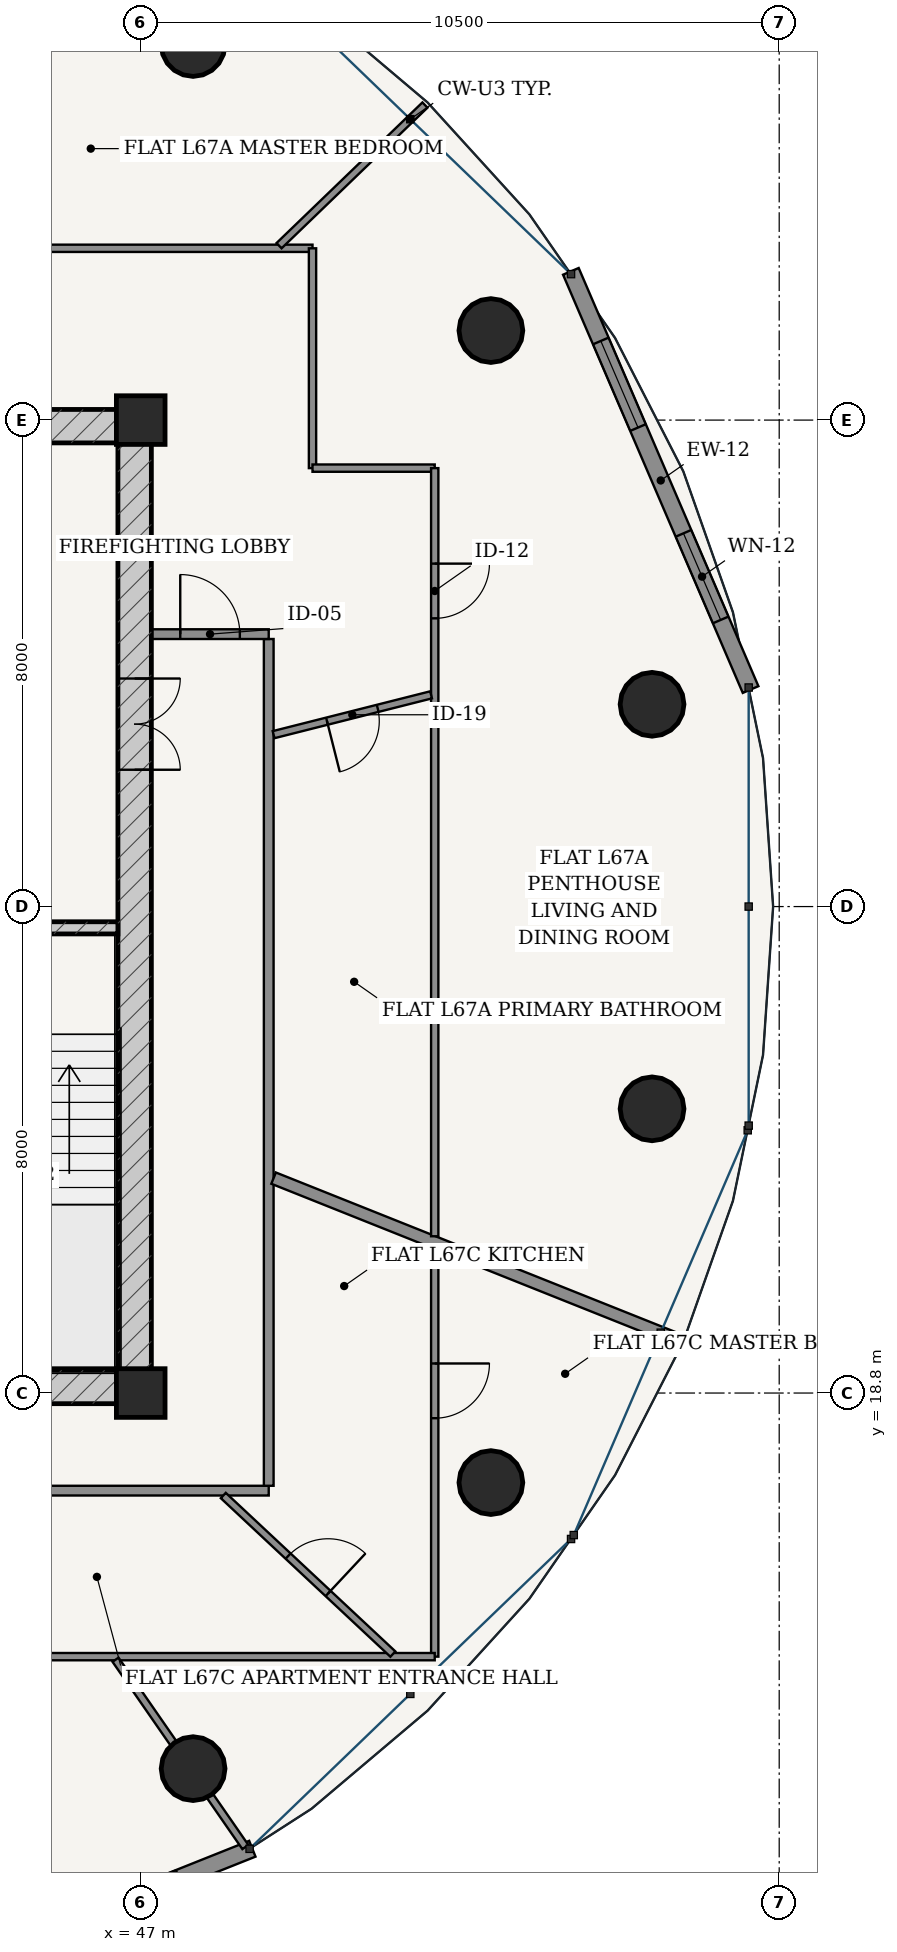
"""IFC4 building model, lengths in metres.
Left out: names, types, materials, properties, quantities, classifications, styles, units other than length and angle.
Written with IfcOpenShell. Run it as: python <this file> out.ifc"""

import sys

from ifc_helpers import new_model, si_unit, direction, frame, frame_2d, origin, origin_2d, place, context, subcontext, project, spatial, rectangle, hollow_circle, extrude, source, transform, mapped, element, fill, save


model = new_model("IFC4")
c1 = context("Model", 3, precision=1e-05, world=origin(), true_north=direction((-0.2419218956, 0.970295726276)))
c2 = subcontext(c1, "Body", "Model", "MODEL_VIEW")
j1 = project(units=[si_unit("LENGTHUNIT", "METRE"), si_unit("PLANEANGLEUNIT", "RADIAN")], contexts=[c1])
p1 = place(None, origin())
s1 = spatial("IfcSite", under=j1, at=p1, CompositionType="ELEMENT")
p2 = place(p1, origin())
s2 = spatial("IfcBuilding", under=s1, at=p2, CompositionType="ELEMENT")
p3 = place(p2, frame((0.0, 0.0, 255.7)))
s3 = spatial("IfcBuildingStorey", under=s2, at=p3, CompositionType="ELEMENT", Elevation=255.7)
for number, where, z_axis, x_axis in (
    (1, (47.0, 18.8, 0.0), (0.0, 0.0, 1.0), (1.0, 0.0, 0.0)),
    (2, (47.0, 34.8, 0.0), (0.0, 0.0, 1.0), (1.0, 0.0, 0.0)),
):
    element("IfcColumn", number, at=place(p3, frame(where, z_axis=z_axis, x_axis=x_axis)), inside=s3, PredefinedType="COLUMN", context=c2, shape_type="SweptSolid", body=[
        extrude(rectangle(XDim=0.8, YDim=0.8, at=origin_2d()), origin(), (0.0, 0.0, 1.0), 3.75),
    ])
p4 = place(p3, frame((28.825, 18.9, 0.0), z_axis=(0.0, 0.0, 1.0), x_axis=(1.0, 0.0, 0.0)))
e3 = element("IfcWall", 3, at=p4, inside=s3, PredefinedType="SHEAR", context=c2, shape_type="SweptSolid", body=[
    extrude(rectangle(XDim=18.35, YDim=0.55, at=frame_2d((9.175, 0.0))), origin(), (0.0, 0.0, 1.0), 3.49),
])
p5 = place(p4, frame((7.41, 0.0, 0.0)))
e4 = element("IfcOpeningElement", 4, at=p5, cuts=e3, PredefinedType="OPENING", context=c2, shape_type="SweptSolid", body=[
    extrude(rectangle(XDim=0.85, YDim=2.1, at=frame_2d((0.425, 1.05))), frame((0.0, 0.285, 0.0), z_axis=(0.0, -1.0, 0.0), x_axis=(1.0, 0.0, 0.0)), (0.0, 0.0, 1.0), 0.57),
])
p6 = place(p4, frame((10.49, 0.0, 0.0)))
e5 = element("IfcOpeningElement", 5, at=p6, cuts=e3, PredefinedType="OPENING", context=c2, shape_type="SweptSolid", body=[
    extrude(rectangle(XDim=0.85, YDim=2.1, at=frame_2d((0.425, 1.05))), frame((0.0, 0.285, 0.0), z_axis=(0.0, -1.0, 0.0), x_axis=(1.0, 0.0, 0.0)), (0.0, 0.0, 1.0), 0.57),
])
p7 = place(p3, frame((28.825, 34.7, 0.0), z_axis=(0.0, 0.0, 1.0), x_axis=(1.0, 0.0, 0.0)))
e6 = element("IfcWall", 6, at=p7, inside=s3, PredefinedType="SHEAR", context=c2, shape_type="SweptSolid", body=[
    extrude(rectangle(XDim=18.35, YDim=0.55, at=frame_2d((9.175, 0.0))), origin(), (0.0, 0.0, 1.0), 3.49),
])
p8 = place(p3, frame((46.9, 19.175, 0.0), z_axis=(0.0, 0.0, 1.0), x_axis=(0.0, 1.0, 0.0)))
e7 = element("IfcWall", 7, at=p8, inside=s3, PredefinedType="SHEAR", context=c2, shape_type="SweptSolid", body=[
    extrude(rectangle(XDim=15.25, YDim=0.55, at=frame_2d((7.625, 0.0))), origin(), (0.0, 0.0, 1.0), 3.49),
])
p9 = place(p8, frame((9.875, 0.0, 0.0)))
e8 = element("IfcOpeningElement", 8, at=p9, cuts=e7, PredefinedType="OPENING", context=c2, shape_type="SweptSolid", body=[
    extrude(rectangle(XDim=1.5, YDim=2.2, at=frame_2d((0.75, 1.1))), frame((0.0, 0.285, 0.0), z_axis=(0.0, -1.0, 0.0), x_axis=(1.0, 0.0, 0.0)), (0.0, 0.0, 1.0), 0.57),
])
p10 = place(p3, frame((43.305, 26.45, 0.0), z_axis=(0.0, 0.0, 1.0), x_axis=(1.0, 0.0, 0.0)))
e9 = element("IfcWall", 9, at=p10, inside=s3, PredefinedType="SOLIDWALL", context=c2, shape_type="SweptSolid", body=[
    extrude(rectangle(XDim=3.32, YDim=0.2, at=frame_2d((1.66, 0.0))), origin(), (0.0, 0.0, 1.0), 3.49),
])
p11 = place(p10, frame((1.185, 0.0, 0.0)))
e10 = element("IfcOpeningElement", 10, at=p11, cuts=e9, PredefinedType="OPENING", context=c2, shape_type="SweptSolid", body=[
    extrude(rectangle(XDim=0.95, YDim=2.15, at=frame_2d((0.475, 1.075))), frame((0.0, 0.11, 0.0), z_axis=(0.0, -1.0, 0.0), x_axis=(1.0, 0.0, 0.0)), (0.0, 0.0, 1.0), 0.22),
])
for number, where, z_axis, x_axis in (
    (11, (55.409, 30.126, 0.0), (0.0, 0.0, 1.0), (1.0, 0.0, 0.0)),
    (12, (52.759, 36.272, 0.0), (0.0, 0.0, 1.0), (1.0, 0.0, 0.0)),
    (13, (47.861, 40.977, 0.0), (0.0, 0.0, 1.0), (1.0, 0.0, 0.0)),
    (14, (47.861, 12.624, 0.0), (0.0, 0.0, 1.0), (1.0, 0.0, 0.0)),
    (15, (52.759, 17.328, 0.0), (0.0, 0.0, 1.0), (1.0, 0.0, 0.0)),
    (16, (55.409, 23.474, 0.0), (0.0, 0.0, 1.0), (1.0, 0.0, 0.0)),
):
    element("IfcColumn", number, at=place(p3, frame(where, z_axis=z_axis, x_axis=x_axis)), inside=s3, PredefinedType="COLUMN", context=c2, shape_type="SweptSolid", body=[
        extrude(hollow_circle(Radius=0.525, WallThickness=0.035, at=origin_2d()), origin(), (0.0, 0.0, 1.0), 3.75),
    ])
p12 = place(p3, frame((57.029, 30.369, 0.0), z_axis=(0.0, 0.0, 1.0), x_axis=(-0.394816612978, 0.918759948037, 0.0)))
e17 = element("IfcWall", 17, at=p12, inside=s3, PredefinedType="SOLIDWALL", context=c2, shape_type="SweptSolid", body=[
    extrude(rectangle(XDim=7.485, YDim=0.28, at=frame_2d((3.743, 0.0))), origin(), (0.0, 0.0, 1.0), 3.49),
])
p13 = place(p12, frame((1.246, 0.0, 0.85)))
e18 = element("IfcOpeningElement", 18, at=p13, cuts=e17, PredefinedType="OPENING", context=c2, shape_type="SweptSolid", body=[
    extrude(rectangle(XDim=1.55, YDim=1.95, at=frame_2d((0.775, 0.975))), frame((0.0, 0.15, 0.0), z_axis=(0.0, -1.0, 0.0), x_axis=(1.0, 0.0, 0.0)), (0.0, 0.0, 1.0), 0.3),
])
p14 = place(p12, frame((4.689, 0.0, 0.85)))
e19 = element("IfcOpeningElement", 19, at=p14, cuts=e17, PredefinedType="OPENING", context=c2, shape_type="SweptSolid", body=[
    extrude(rectangle(XDim=1.55, YDim=1.95, at=frame_2d((0.775, 0.975))), frame((0.0, 0.15, 0.0), z_axis=(0.0, -1.0, 0.0), x_axis=(1.0, 0.0, 0.0)), (0.0, 0.0, 1.0), 0.3),
])
p15 = place(p3, frame((41.705, 8.459, 0.0), z_axis=(0.0, 0.0, 1.0), x_axis=(0.92871332341, 0.370798547626, 0.0)))
e20 = element("IfcWall", 20, at=p15, inside=s3, PredefinedType="SOLIDWALL", context=c2, shape_type="SweptSolid", body=[
    extrude(rectangle(XDim=7.678, YDim=0.28, at=frame_2d((3.839, 0.0))), origin(), (0.0, 0.0, 1.0), 3.49),
])
p16 = place(p15, frame((1.298, 0.0, 0.85)))
e21 = element("IfcOpeningElement", 21, at=p16, cuts=e20, PredefinedType="OPENING", context=c2, shape_type="SweptSolid", body=[
    extrude(rectangle(XDim=1.55, YDim=1.95, at=frame_2d((0.775, 0.975))), frame((0.0, 0.15, 0.0), z_axis=(0.0, -1.0, 0.0), x_axis=(1.0, 0.0, 0.0)), (0.0, 0.0, 1.0), 0.3),
])
p17 = place(p15, frame((4.83, 0.0, 0.85)))
e22 = element("IfcOpeningElement", 22, at=p17, cuts=e20, PredefinedType="OPENING", context=c2, shape_type="SweptSolid", body=[
    extrude(rectangle(XDim=1.55, YDim=1.95, at=frame_2d((0.775, 0.975))), frame((0.0, 0.15, 0.0), z_axis=(0.0, -1.0, 0.0), x_axis=(1.0, 0.0, 0.0)), (0.0, 0.0, 1.0), 0.3),
])
p18 = place(p3, frame((26.895, 17.195, 0.0), z_axis=(0.0, 0.0, 1.0), x_axis=(1.0, 0.0, 0.0)))
e23 = element("IfcWall", 23, at=p18, inside=s3, PredefinedType="PARTITIONING", context=c2, shape_type="SweptSolid", body=[
    extrude(rectangle(XDim=22.21, YDim=0.16, at=frame_2d((11.105, 0.0))), origin(), (0.0, 0.0, 1.0), 3.015),
])
p19 = place(p18, frame((2.861, 0.0, 0.0)))
e24 = element("IfcOpeningElement", 24, at=p19, cuts=e23, PredefinedType="OPENING", context=c2, shape_type="SweptSolid", body=[
    extrude(rectangle(XDim=0.98, YDim=2.2, at=frame_2d((0.49, 1.1))), frame((0.0, 0.09, 0.0), z_axis=(0.0, -1.0, 0.0), x_axis=(1.0, 0.0, 0.0)), (0.0, 0.0, 1.0), 0.18),
])
p20 = place(p18, frame((16.97, 0.0, 0.0)))
e25 = element("IfcOpeningElement", 25, at=p20, cuts=e23, PredefinedType="OPENING", context=c2, shape_type="SweptSolid", body=[
    extrude(rectangle(XDim=0.98, YDim=2.2, at=frame_2d((0.49, 1.1))), frame((0.0, 0.09, 0.0), z_axis=(0.0, -1.0, 0.0), x_axis=(1.0, 0.0, 0.0)), (0.0, 0.0, 1.0), 0.18),
])
p21 = place(p3, frame((49.105, 17.275, 0.0), z_axis=(0.0, 0.0, 1.0), x_axis=(0.0, 1.0, 0.0)))
e26 = element("IfcWall", 26, at=p21, inside=s3, PredefinedType="PARTITIONING", context=c2, shape_type="SweptSolid", body=[
    extrude(rectangle(XDim=13.925, YDim=0.16, at=frame_2d((6.962, 0.0))), origin(), (0.0, 0.0, 1.0), 3.015),
])
p22 = place(p3, frame((47.175, 31.28, 0.0), z_axis=(0.0, 0.0, 1.0), x_axis=(1.0, 0.0, 0.0)))
e27 = element("IfcWall", 27, at=p22, inside=s3, PredefinedType="PARTITIONING", context=c2, shape_type="SweptSolid", body=[
    extrude(rectangle(XDim=1.93, YDim=0.16, at=frame_2d((0.965, 0.0))), origin(), (0.0, 0.0, 1.0), 3.49),
])
p23 = place(p22, frame((0.475, 0.0, 0.0)))
e28 = element("IfcOpeningElement", 28, at=p23, cuts=e27, PredefinedType="OPENING", context=c2, shape_type="SweptSolid", body=[
    extrude(rectangle(XDim=0.98, YDim=2.2, at=frame_2d((0.49, 1.1))), frame((0.0, 0.09, 0.0), z_axis=(0.0, -1.0, 0.0), x_axis=(1.0, 0.0, 0.0)), (0.0, 0.0, 1.0), 0.18),
])
p24 = place(p3, frame((49.185, 22.334, 0.0), z_axis=(0.0, 0.0, 1.0), x_axis=(0.928710518269, -0.370805573389, 0.0)))
e29 = element("IfcWall", 29, at=p24, inside=s3, PredefinedType="PARTITIONING", context=c2, shape_type="SweptSolid", body=[
    extrude(rectangle(XDim=7.195, YDim=0.2, at=frame_2d((3.598, 0.0))), origin(), (0.0, 0.0, 1.0), 3.121),
])
p25 = place(p3, frame((26.175, 37.625, 0.0), z_axis=(0.0, 0.0, 1.0), x_axis=(1.0, 0.0, 0.0)))
e30 = element("IfcWall", 30, at=p25, inside=s3, PredefinedType="PARTITIONING", context=c2, shape_type="SweptSolid", body=[
    extrude(rectangle(XDim=23.65, YDim=0.12, at=frame_2d((11.825, 0.0))), origin(), (0.0, 0.0, 1.0), 3.015),
])
p26 = place(p25, frame((12.791, 0.0, 0.0)))
e31 = element("IfcOpeningElement", 31, at=p26, cuts=e30, PredefinedType="OPENING", context=c2, shape_type="SweptSolid", body=[
    extrude(rectangle(XDim=0.9, YDim=2.15, at=frame_2d((0.45, 1.075))), frame((0.0, 0.07, 0.0), z_axis=(0.0, -1.0, 0.0), x_axis=(1.0, 0.0, 0.0)), (0.0, 0.0, 1.0), 0.14),
])
p27 = place(p25, frame((6.48, 0.0, 0.0)))
e32 = element("IfcOpeningElement", 32, at=p27, cuts=e30, PredefinedType="OPENING", context=c2, shape_type="SweptSolid", body=[
    extrude(rectangle(XDim=0.9, YDim=2.15, at=frame_2d((0.45, 1.075))), frame((0.0, 0.07, 0.0), z_axis=(0.0, -1.0, 0.0), x_axis=(1.0, 0.0, 0.0)), (0.0, 0.0, 1.0), 0.14),
])
p28 = place(p25, frame((1.831, 0.0, 0.0)))
e33 = element("IfcOpeningElement", 33, at=p28, cuts=e30, PredefinedType="OPENING", context=c2, shape_type="SweptSolid", body=[
    extrude(rectangle(XDim=0.9, YDim=2.15, at=frame_2d((0.45, 1.075))), frame((0.0, 0.07, 0.0), z_axis=(0.0, -1.0, 0.0), x_axis=(1.0, 0.0, 0.0)), (0.0, 0.0, 1.0), 0.14),
])
p29 = place(p3, frame((49.825, 37.625, 0.0), z_axis=(0.0, 0.0, 1.0), x_axis=(0.0, -1.0, 0.0)))
e34 = element("IfcWall", 34, at=p29, inside=s3, PredefinedType="PARTITIONING", context=c2, shape_type="SweptSolid", body=[
    extrude(rectangle(XDim=3.615, YDim=0.12, at=frame_2d((1.808, 0.0))), origin(), (0.0, 0.0, 1.0), 3.015),
])
p30 = place(p3, frame((49.825, 34.01, 0.0), z_axis=(0.0, 0.0, 1.0), x_axis=(1.0, 0.0, 0.0)))
e35 = element("IfcWall", 35, at=p30, inside=s3, PredefinedType="PARTITIONING", context=c2, shape_type="SweptSolid", body=[
    extrude(rectangle(XDim=2.01, YDim=0.12, at=frame_2d((1.005, 0.0))), origin(), (0.0, 0.0, 1.0), 3.209),
])
p31 = place(p3, frame((51.835, 34.01, 0.0), z_axis=(0.0, 0.0, 1.0), x_axis=(0.0, -1.0, 0.0)))
e36 = element("IfcWall", 36, at=p31, inside=s3, PredefinedType="PARTITIONING", context=c2, shape_type="SweptSolid", body=[
    extrude(rectangle(XDim=12.632, YDim=0.12, at=frame_2d((6.316, 0.0))), origin(), (0.0, 0.0, 1.0), 3.015),
])
p32 = place(p31, frame((1.57, 0.0, 0.0)))
e37 = element("IfcOpeningElement", 37, at=p32, cuts=e36, PredefinedType="OPENING", context=c2, shape_type="SweptSolid", body=[
    extrude(rectangle(XDim=0.9, YDim=2.15, at=frame_2d((0.45, 1.075))), frame((0.0, 0.07, 0.0), z_axis=(0.0, -1.0, 0.0), x_axis=(1.0, 0.0, 0.0)), (0.0, 0.0, 1.0), 0.14),
])
p33 = place(p3, frame((49.275, 37.668, 0.0), z_axis=(0.0, 0.0, 1.0), x_axis=(0.719954096891, 0.694021684366, 0.0)))
e38 = element("IfcWall", 38, at=p33, inside=s3, PredefinedType="PARTITIONING", context=c2, shape_type="SweptSolid", body=[
    extrude(rectangle(XDim=3.333, YDim=0.12, at=frame_2d((1.667, 0.0))), origin(), (0.0, 0.0, 1.0), 3.121),
])
p34 = place(p3, frame((49.185, 29.627, 0.0), z_axis=(0.0, 0.0, 1.0), x_axis=(0.969515658159, 0.2450293627, 0.0)))
e39 = element("IfcWall", 39, at=p34, inside=s3, PredefinedType="PARTITIONING", context=c2, shape_type="SweptSolid", body=[
    extrude(rectangle(XDim=2.671, YDim=0.12, at=frame_2d((1.336, 0.0))), origin(), (0.0, 0.0, 1.0), 3.209),
])
p35 = place(p34, frame((0.906, 0.0, 0.0)))
e40 = element("IfcOpeningElement", 40, at=p35, cuts=e39, PredefinedType="OPENING", context=c2, shape_type="SweptSolid", body=[
    extrude(rectangle(XDim=0.86, YDim=2.15, at=frame_2d((0.43, 1.075))), frame((0.0, 0.07, 0.0), z_axis=(0.0, -1.0, 0.0), x_axis=(1.0, 0.0, 0.0)), (0.0, 0.0, 1.0), 0.14),
])
p36 = place(p3, frame((51.835, 21.174, 0.0), z_axis=(0.0, 0.0, 1.0), x_axis=(0.0, -1.0, 0.0)))
e41 = element("IfcWall", 41, at=p36, inside=s3, PredefinedType="PARTITIONING", context=c2, shape_type="SweptSolid", body=[
    extrude(rectangle(XDim=6.709, YDim=0.12, at=frame_2d((3.354, 0.0))), origin(), (0.0, 0.0, 1.0), 3.015),
])
p37 = place(p36, frame((1.888, 0.0, 0.0)))
e42 = element("IfcOpeningElement", 42, at=p37, cuts=e41, PredefinedType="OPENING", context=c2, shape_type="SweptSolid", body=[
    extrude(rectangle(XDim=0.9, YDim=2.15, at=frame_2d((0.45, 1.075))), frame((0.0, 0.07, 0.0), z_axis=(0.0, -1.0, 0.0), x_axis=(1.0, 0.0, 0.0)), (0.0, 0.0, 1.0), 0.14),
])
p38 = place(p3, frame((51.835, 14.465, 0.0), z_axis=(0.0, 0.0, 1.0), x_axis=(-1.0, 0.0, 0.0)))
e43 = element("IfcWall", 43, at=p38, inside=s3, PredefinedType="PARTITIONING", context=c2, shape_type="SweptSolid", body=[
    extrude(rectangle(XDim=16.278, YDim=0.12, at=frame_2d((8.139, 0.0))), origin(), (0.0, 0.0, 1.0), 3.015),
])
p39 = place(p38, frame((7.665, 0.0, 0.0)))
e44 = element("IfcOpeningElement", 44, at=p39, cuts=e43, PredefinedType="OPENING", context=c2, shape_type="SweptSolid", body=[
    extrude(rectangle(XDim=0.9, YDim=2.15, at=frame_2d((0.45, 1.075))), frame((0.0, 0.07, 0.0), z_axis=(0.0, -1.0, 0.0), x_axis=(1.0, 0.0, 0.0)), (0.0, 0.0, 1.0), 0.14),
])
p40 = place(p3, frame((46.586, 14.414, 0.0), z_axis=(0.0, 0.0, 1.0), x_axis=(0.569657021681, -0.821882520589, 0.0)))
e45 = element("IfcWall", 45, at=p40, inside=s3, PredefinedType="PARTITIONING", context=c2, shape_type="SweptSolid", body=[
    extrude(rectangle(XDim=3.748, YDim=0.12, at=frame_2d((1.874, 0.0))), origin(), (0.0, 0.0, 1.0), 3.015),
])
p41 = place(p3, frame((48.358, 17.115, 0.0), z_axis=(0.0, 0.0, 1.0), x_axis=(0.730431927487, -0.682985504464, 0.0)))
e46 = element("IfcWall", 46, at=p41, inside=s3, PredefinedType="PARTITIONING", context=c2, shape_type="SweptSolid", body=[
    extrude(rectangle(XDim=3.818, YDim=0.12, at=frame_2d((1.909, 0.0))), origin(), (0.0, 0.0, 1.0), 3.121),
])
p42 = place(p41, frame((1.459, 0.0, 0.0)))
e47 = element("IfcOpeningElement", 47, at=p42, cuts=e46, PredefinedType="OPENING", context=c2, shape_type="SweptSolid", body=[
    extrude(rectangle(XDim=0.9, YDim=2.15, at=frame_2d((0.45, 1.075))), frame((0.0, 0.07, 0.0), z_axis=(0.0, -1.0, 0.0), x_axis=(1.0, 0.0, 0.0)), (0.0, 0.0, 1.0), 0.14),
])
m1 = source(origin(), c2, "Body", "SweptSolid", [
    extrude(rectangle(XDim=1.55, YDim=1.95, at=frame_2d((0.775, 0.975))), frame((0.0, 0.03, 0.0), z_axis=(0.0, -1.0, 0.0), x_axis=(1.0, 0.0, 0.0)), (0.0, 0.0, 1.0), 0.06),
])
p43 = place(p13, origin())
e48 = element("IfcWindow", 48, at=p43, inside=s3, PartitioningType="SINGLE_PANEL", PredefinedType="WINDOW", context=c2, shape_type="MappedRepresentation", body=[
    mapped(m1, transform((0.0, 0.0, 0.0), scale=1.0)),
])
fill(e18, e48)
p44 = place(p14, origin())
e49 = element("IfcWindow", 49, at=p44, inside=s3, PartitioningType="SINGLE_PANEL", PredefinedType="WINDOW", context=c2, shape_type="MappedRepresentation", body=[
    mapped(m1, transform((0.0, 0.0, 0.0), scale=1.0)),
])
fill(e19, e49)
m2 = source(origin(), c2, "Body", "SweptSolid", [
    extrude(rectangle(XDim=1.5, YDim=2.2, at=frame_2d((0.75, 1.1))), frame((0.0, 0.025, 0.0), z_axis=(0.0, -1.0, 0.0), x_axis=(1.0, 0.0, 0.0)), (0.0, 0.0, 1.0), 0.05),
])
p45 = place(p9, frame((1.5, 0.0, 0.0), z_axis=(0.0, 0.0, 1.0), x_axis=(-1.0, 0.0, 0.0)))
e50 = element("IfcDoor", 50, at=p45, inside=s3, OperationType="DOUBLE_DOOR_SINGLE_SWING", PredefinedType="DOOR", context=c2, shape_type="MappedRepresentation", body=[
    mapped(m2, transform((0.0, 0.0, 0.0), scale=1.0)),
])
fill(e8, e50)
m3 = source(origin(), c2, "Body", "SweptSolid", [
    extrude(rectangle(XDim=0.98, YDim=2.2, at=frame_2d((0.49, 1.1))), frame((0.0, 0.025, 0.0), z_axis=(0.0, -1.0, 0.0), x_axis=(1.0, 0.0, 0.0)), (0.0, 0.0, 1.0), 0.05),
])
p46 = place(p23, origin())
e51 = element("IfcDoor", 51, at=p46, inside=s3, OperationType="SINGLE_SWING_LEFT", PredefinedType="DOOR", context=c2, shape_type="MappedRepresentation", body=[
    mapped(m3, transform((0.0, 0.0, 0.0), scale=1.0)),
])
fill(e28, e51)
m4 = source(origin(), c2, "Body", "SweptSolid", [
    extrude(rectangle(XDim=0.86, YDim=2.15, at=frame_2d((0.43, 1.075))), frame((0.0, 0.025, 0.0), z_axis=(0.0, -1.0, 0.0), x_axis=(1.0, 0.0, 0.0)), (0.0, 0.0, 1.0), 0.05),
])
p47 = place(p35, frame((0.86, 0.0, 0.0), z_axis=(0.0, 0.0, 1.0), x_axis=(-1.0, 0.0, 0.0)))
e52 = element("IfcDoor", 52, at=p47, inside=s3, OperationType="SINGLE_SWING_RIGHT", PredefinedType="DOOR", context=c2, shape_type="MappedRepresentation", body=[
    mapped(m4, transform((0.0, 0.0, 0.0), scale=1.0)),
])
fill(e40, e52)
m5 = source(origin(), c2, "Body", "SweptSolid", [
    extrude(rectangle(XDim=0.9, YDim=2.15, at=frame_2d((0.45, 1.075))), frame((0.0, 0.025, 0.0), z_axis=(0.0, -1.0, 0.0), x_axis=(1.0, 0.0, 0.0)), (0.0, 0.0, 1.0), 0.05),
])
p48 = place(p32, origin())
e53 = element("IfcDoor", 53, at=p48, inside=s3, OperationType="SINGLE_SWING_LEFT", PredefinedType="DOOR", context=c2, shape_type="MappedRepresentation", body=[
    mapped(m5, transform((0.0, 0.0, 0.0), scale=1.0)),
])
fill(e37, e53)
p49 = place(p42, origin())
e54 = element("IfcDoor", 54, at=p49, inside=s3, OperationType="SINGLE_SWING_RIGHT", PredefinedType="DOOR", context=c2, shape_type="MappedRepresentation", body=[
    mapped(m5, transform((0.0, 0.0, 0.0), scale=1.0)),
])
fill(e47, e54)
p50 = place(p37, origin())
e55 = element("IfcDoor", 55, at=p50, inside=s3, OperationType="SINGLE_SWING_LEFT", PredefinedType="DOOR", context=c2, shape_type="MappedRepresentation", body=[
    mapped(m5, transform((0.0, 0.0, 0.0), scale=1.0)),
])
fill(e42, e55)
save(model, sys.argv[1])
